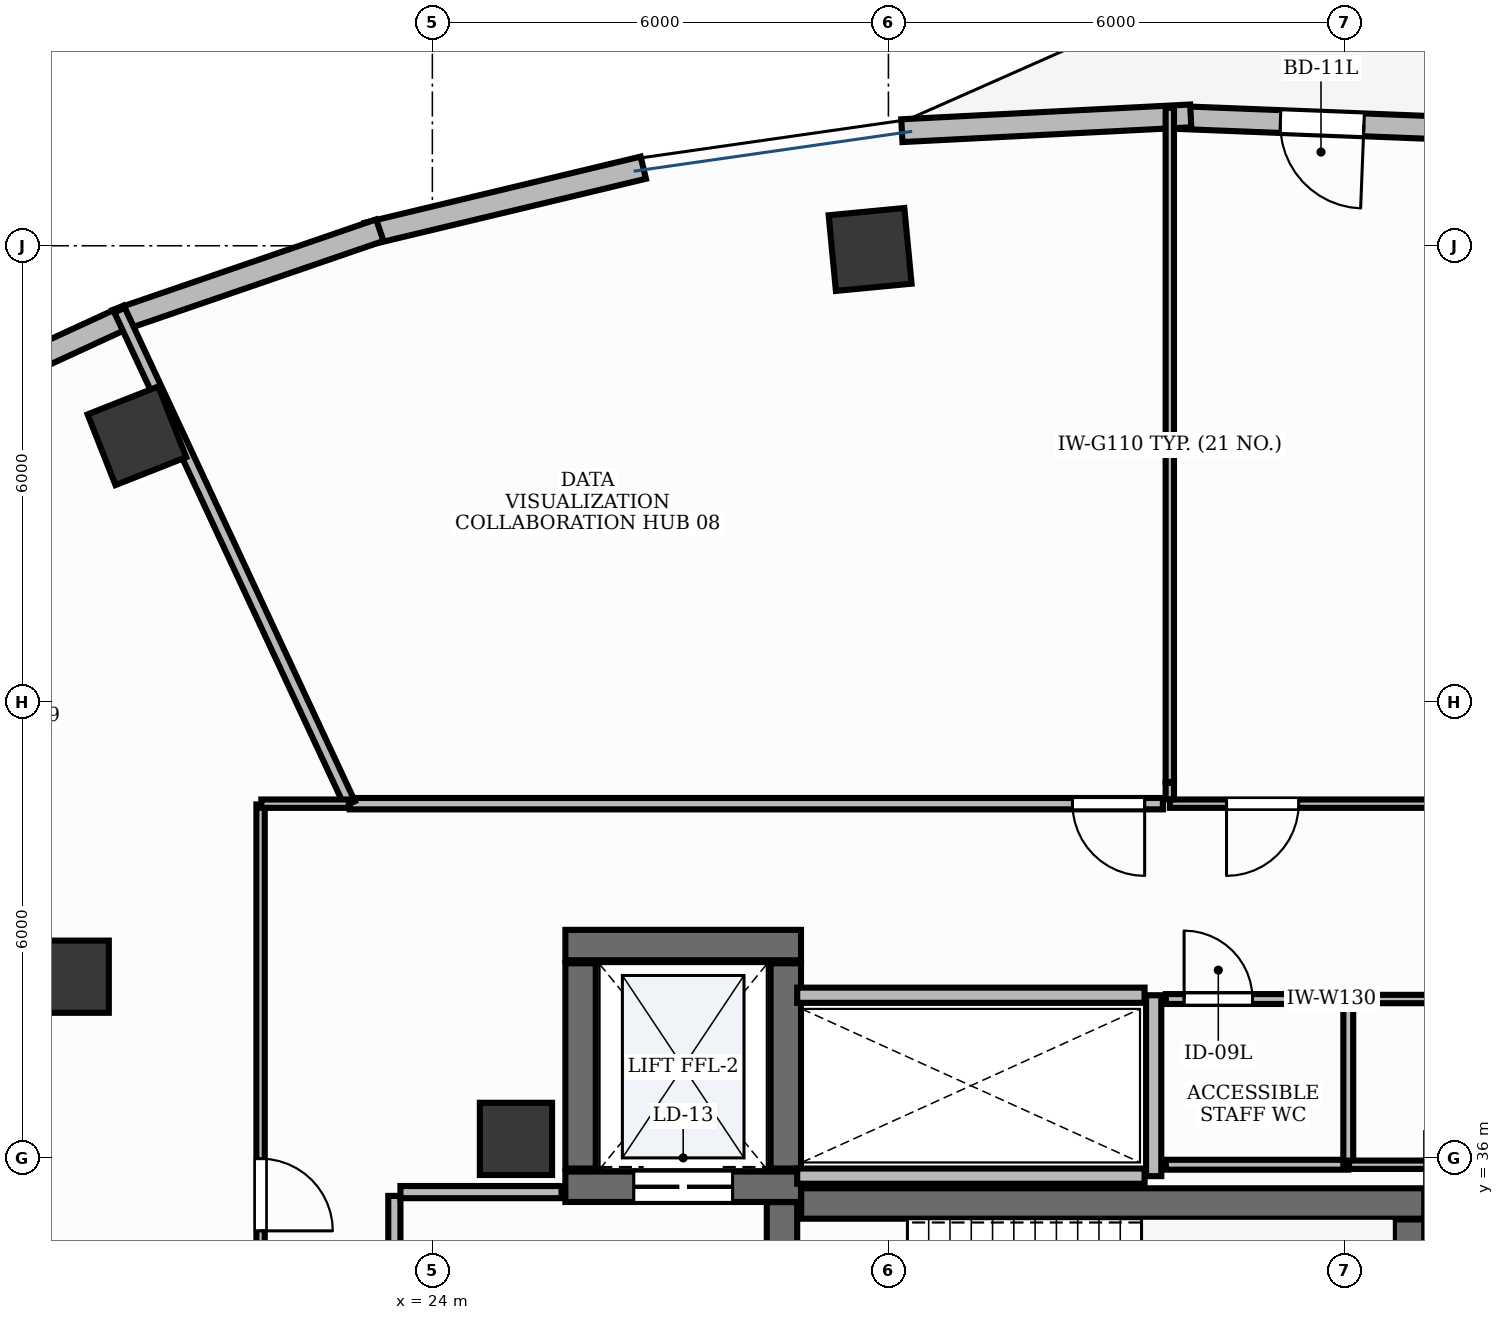
"""IFC4 building model, lengths in metres.
Left out: names, types, materials, properties, quantities, classifications, styles, units other than length and angle.
Written with IfcOpenShell. Run it as: python <this file> out.ifc"""

import sys

from ifc_helpers import new_model, si_unit, direction, frame, frame_2d, origin, origin_2d, place, context, subcontext, project, spatial, rectangle, extrude, element, fill, save


model = new_model("IFC4")
c1 = context("Model", 3, precision=1e-05, world=origin(), true_north=direction((0.0, 1.0)))
c2 = subcontext(c1, "Body", "Model", "MODEL_VIEW")
j1 = project(units=[si_unit("LENGTHUNIT", "METRE"), si_unit("PLANEANGLEUNIT", "RADIAN")], contexts=[c1])
p1 = place(None, origin())
s1 = spatial("IfcSite", under=j1, at=p1, CompositionType="ELEMENT")
p2 = place(p1, origin())
s2 = spatial("IfcBuilding", under=s1, at=p2, CompositionType="ELEMENT")
p3 = place(p2, frame((0.0, 0.0, 231.0)))
s3 = spatial("IfcBuildingStorey", under=s2, at=p3, CompositionType="ELEMENT", Elevation=231.0)
p4 = place(p3, frame((28.852, 35.4, 0.0), z_axis=(0.0, 0.0, 1.0), x_axis=(1.0, 0.0, 0.0)))
e1 = element("IfcWall", 1, at=p4, inside=s3, PredefinedType="SHEAR", context=c2, shape_type="SweptSolid", body=[
    extrude(rectangle(XDim=8.198, YDim=0.4, at=frame_2d((4.099, 0.0))), origin(), (0.0, 0.0, 1.0), 3.9),
])
p5 = place(p3, frame((36.85, 32.11, 0.0), z_axis=(0.0, 0.0, 1.0), x_axis=(0.0, 1.0, 0.0)))
e2 = element("IfcWall", 2, at=p5, inside=s3, PredefinedType="SHEAR", context=c2, shape_type="SweptSolid", body=[
    extrude(rectangle(XDim=3.08, YDim=0.4, at=frame_2d((1.54, 0.0))), origin(), (0.0, 0.0, 1.0), 3.9),
])
p6 = place(p3, frame((28.6, 32.11, 0.0), z_axis=(0.0, 0.0, 1.0), x_axis=(0.0, 1.0, 0.0)))
e3 = element("IfcWall", 3, at=p6, inside=s3, PredefinedType="SHEAR", context=c2, shape_type="SweptSolid", body=[
    extrude(rectangle(XDim=3.308, YDim=0.4, at=frame_2d((1.654, 0.0))), origin(), (0.0, 0.0, 1.0), 3.9),
])
p7 = place(p6, frame((0.2, 0.0, 0.0)))
e4 = element("IfcOpeningElement", 4, at=p7, cuts=e3, PredefinedType="OPENING", context=c2, shape_type="SweptSolid", body=[
    extrude(rectangle(XDim=1.05, YDim=2.15, at=frame_2d((0.525, 1.075))), frame((0.0, 0.215, 0.0), z_axis=(0.0, -1.0, 0.0), x_axis=(1.0, 0.0, 0.0)), (0.0, 0.0, 1.0), 0.43),
])
p8 = place(p3, frame((25.75, 38.8, 0.0), z_axis=(0.0, 0.0, 1.0), x_axis=(1.0, 0.0, 0.0)))
e5 = element("IfcWall", 5, at=p8, inside=s3, PredefinedType="SHEAR", context=c2, shape_type="SweptSolid", body=[
    extrude(rectangle(XDim=3.1, YDim=0.4, at=frame_2d((1.55, 0.0))), origin(), (0.0, 0.0, 1.0), 3.9),
])
p9 = place(p3, frame((25.75, 35.62, 0.0), z_axis=(0.0, 0.0, 1.0), x_axis=(1.0, 0.0, 0.0)))
e6 = element("IfcWall", 6, at=p9, inside=s3, PredefinedType="SHEAR", context=c2, shape_type="SweptSolid", body=[
    extrude(rectangle(XDim=3.1, YDim=0.4, at=frame_2d((1.55, 0.0))), origin(), (0.0, 0.0, 1.0), 3.9),
])
p10 = place(p9, frame((0.9, 0.0, 0.0)))
e7 = element("IfcOpeningElement", 7, at=p10, cuts=e6, PredefinedType="OPENING", context=c2, shape_type="SweptSolid", body=[
    extrude(rectangle(XDim=1.3, YDim=2.2, at=frame_2d((0.65, 1.1))), frame((0.0, 0.215, 0.0), z_axis=(0.0, -1.0, 0.0), x_axis=(1.0, 0.0, 0.0)), (0.0, 0.0, 1.0), 0.43),
])
for number, where, z_axis, x_axis in (
    (8, (25.95, 35.86, 0.0), (0.0, 0.0, 1.0), (0.0, 1.0, 0.0)),
    (9, (28.65, 35.86, 0.0), (0.0, 0.0, 1.0), (0.0, 1.0, 0.0)),
):
    element("IfcWall", number, at=place(p3, frame(where, z_axis=z_axis, x_axis=x_axis)), inside=s3, PredefinedType="SHEAR", context=c2, shape_type="SweptSolid", body=[
        extrude(rectangle(XDim=2.7, YDim=0.4, at=frame_2d((1.35, 0.0))), origin(), (0.0, 0.0, 1.0), 3.9),
    ])
p11 = place(p3, frame((25.1, 36.25, -0.0), z_axis=(0.0, 0.0, 1.0), x_axis=(1.0, 0.0, 0.0)))
e10 = element("IfcColumn", 10, at=p11, inside=s3, PredefinedType="PILASTER", context=c2, shape_type="SweptSolid", body=[
    extrude(rectangle(XDim=0.95, YDim=0.95, at=origin_2d()), origin(), (0.0, 0.0, 1.0), 3.901),
])
for number, where, z_axis, x_axis in (
    (11, (29.759, 47.951, -0.0), (0.0, 0.0, 1.0), (0.995, 0.095, 0.0)),
    (12, (20.113, 45.5, -0.0), (0.0, 0.0, 1.0), (0.93, 0.367, 0.0)),
):
    element("IfcColumn", number, at=place(p3, frame(where, z_axis=z_axis, x_axis=x_axis)), inside=s3, PredefinedType="COLUMN", context=c2, shape_type="SweptSolid", body=[
        extrude(rectangle(XDim=1.0, YDim=1.0, at=origin_2d()), origin(), (0.0, 0.0, 1.0), 3.901),
    ])
p12 = place(p3, frame((19.268, 38.384, -0.0), z_axis=(0.0, 0.0, 1.0), x_axis=(1.0, 0.0, 0.0)))
e13 = element("IfcColumn", 13, at=p12, inside=s3, PredefinedType="COLUMN", context=c2, shape_type="SweptSolid", body=[
    extrude(rectangle(XDim=0.95, YDim=0.95, at=origin_2d()), origin(), (0.0, 0.0, 1.0), 3.901),
])
p13 = place(p3, frame((37.588, 49.538, 0.0), z_axis=(0.0, 0.0, 1.0), x_axis=(-0.999223368644, 0.03940380128, 0.0)))
e14 = element("IfcWall", 14, at=p13, inside=s3, PredefinedType="STANDARD", context=c2, shape_type="SweptSolid", body=[
    extrude(rectangle(XDim=3.767, YDim=0.3, at=frame_2d((1.884, 0.0))), origin(), (0.0, 0.0, 1.0), 3.9),
])
p14 = place(p13, frame((1.333, 0.0, 0.0)))
e15 = element("IfcOpeningElement", 15, at=p14, cuts=e14, PredefinedType="OPENING", context=c2, shape_type="SweptSolid", body=[
    extrude(rectangle(XDim=1.1, YDim=2.15, at=frame_2d((0.55, 1.075))), frame((0.0, 0.165, 0.0), z_axis=(0.0, -1.0, 0.0), x_axis=(1.0, 0.0, 0.0)), (0.0, 0.0, 1.0), 0.33),
])
p15 = place(p3, frame((33.977, 49.708, 0.0), z_axis=(0.0, 0.0, 1.0), x_axis=(-0.998691783215, -0.051134353798, 0.0)))
e16 = element("IfcWall", 16, at=p15, inside=s3, PredefinedType="STANDARD", context=c2, shape_type="SweptSolid", body=[
    extrude(rectangle(XDim=3.805, YDim=0.3, at=frame_2d((1.903, 0.0))), origin(), (0.0, 0.0, 1.0), 3.47),
])
p16 = place(p3, frame((26.775, 49.027, 0.0), z_axis=(0.0, 0.0, 1.0), x_axis=(-0.972475629939, -0.233004611918, 0.0)))
e17 = element("IfcWall", 17, at=p16, inside=s3, PredefinedType="STANDARD", context=c2, shape_type="SweptSolid", body=[
    extrude(rectangle(XDim=3.735, YDim=0.3, at=frame_2d((1.868, 0.0))), origin(), (0.0, 0.0, 1.0), 3.9),
])
p17 = place(p3, frame((23.309, 48.205, 0.0), z_axis=(0.0, 0.0, 1.0), x_axis=(-0.945722383555, -0.32497565023, 0.0)))
e18 = element("IfcWall", 18, at=p17, inside=s3, PredefinedType="STANDARD", context=c2, shape_type="SweptSolid", body=[
    extrude(rectangle(XDim=3.67, YDim=0.3, at=frame_2d((1.835, 0.0))), origin(), (0.0, 0.0, 1.0), 3.9),
])
p18 = place(p3, frame((20.0, 47.077, 0.0), z_axis=(0.0, 0.0, 1.0), x_axis=(-0.908506474671, -0.417870776055, 0.0)))
e19 = element("IfcWall", 19, at=p18, inside=s3, PredefinedType="STANDARD", context=c2, shape_type="SweptSolid", body=[
    extrude(rectangle(XDim=3.587, YDim=0.3, at=frame_2d((1.793, 0.0))), origin(), (0.0, 0.0, 1.0), 3.9),
])
p19 = place(p3, frame((33.49, 35.76, 0.0), z_axis=(0.0, 0.0, 1.0), x_axis=(0.0, 1.0, 0.0)))
e20 = element("IfcWall", 20, at=p19, inside=s3, PredefinedType="PARTITIONING", context=c2, shape_type="SweptSolid", body=[
    extrude(rectangle(XDim=2.38, YDim=0.2, at=frame_2d((1.19, 0.0))), origin(), (0.0, 0.0, 1.0), 2.91),
])
for number, where, z_axis, x_axis in (
    (21, (28.8, 35.76, 0.0), (0.0, 0.0, 1.0), (1.0, 0.0, 0.0)),
    (22, (28.8, 38.14, 0.0), (0.0, 0.0, 1.0), (1.0, 0.0, 0.0)),
):
    element("IfcWall", number, at=place(p3, frame(where, z_axis=z_axis, x_axis=x_axis)), inside=s3, PredefinedType="PARTITIONING", context=c2, shape_type="SweptSolid", body=[
        extrude(rectangle(XDim=4.57, YDim=0.2, at=frame_2d((2.285, 0.0))), origin(), (0.0, 0.0, 1.0), 2.91),
    ])
p20 = place(p3, frame((23.5, 32.1, 0.0), z_axis=(0.0, 0.0, 1.0), x_axis=(0.0, 1.0, 0.0)))
e23 = element("IfcWall", 23, at=p20, inside=s3, PredefinedType="PARTITIONING", context=c2, shape_type="SweptSolid", body=[
    extrude(rectangle(XDim=3.4, YDim=0.16, at=frame_2d((1.7, 0.0))), origin(), (0.0, 0.0, 1.0), 2.91),
])
p21 = place(p20, frame((1.175, 0.0, 0.0)))
e24 = element("IfcOpeningElement", 24, at=p21, cuts=e23, PredefinedType="OPENING", context=c2, shape_type="SweptSolid", body=[
    extrude(rectangle(XDim=1.05, YDim=2.15, at=frame_2d((0.525, 1.075))), frame((0.0, 0.095, 0.0), z_axis=(0.0, -1.0, 0.0), x_axis=(1.0, 0.0, 0.0)), (0.0, 0.0, 1.0), 0.19),
])
p22 = place(p3, frame((23.58, 35.55, 0.0), z_axis=(0.0, 0.0, 1.0), x_axis=(1.0, 0.0, 0.0)))
e25 = element("IfcWall", 25, at=p22, inside=s3, PredefinedType="PARTITIONING", context=c2, shape_type="SweptSolid", body=[
    extrude(rectangle(XDim=2.12, YDim=0.16, at=frame_2d((1.06, 0.0))), origin(), (0.0, 0.0, 1.0), 2.91),
])
p23 = place(p3, frame((33.65, 38.09, 0.0), z_axis=(0.0, 0.0, 1.0), x_axis=(1.0, 0.0, 0.0)))
e26 = element("IfcWall", 26, at=p23, inside=s3, PredefinedType="PARTITIONING", context=c2, shape_type="SweptSolid", body=[
    extrude(rectangle(XDim=2.4, YDim=0.13, at=frame_2d((1.2, 0.0))), origin(), (0.0, 0.0, 1.0), 2.91),
])
p24 = place(p23, frame((0.24, 0.0, 0.0)))
e27 = element("IfcOpeningElement", 27, at=p24, cuts=e26, PredefinedType="OPENING", context=c2, shape_type="SweptSolid", body=[
    extrude(rectangle(XDim=0.9, YDim=2.15, at=frame_2d((0.45, 1.075))), frame((0.0, 0.08, 0.0), z_axis=(0.0, -1.0, 0.0), x_axis=(1.0, 0.0, 0.0)), (0.0, 0.0, 1.0), 0.16),
])
p25 = place(p3, frame((37.2, 40.66, 0.0), z_axis=(0.0, 0.0, 1.0), x_axis=(-1.0, 0.0, 0.0)))
e28 = element("IfcWall", 28, at=p25, inside=s3, PredefinedType="MOVABLE", context=c2, shape_type="SweptSolid", body=[
    extrude(rectangle(XDim=3.498, YDim=0.11, at=frame_2d((1.749, 0.0))), origin(), (0.0, 0.0, 1.0), 2.91),
])
p26 = place(p25, frame((1.802, 0.0, 0.0)))
e29 = element("IfcOpeningElement", 29, at=p26, cuts=e28, PredefinedType="OPENING", context=c2, shape_type="SweptSolid", body=[
    extrude(rectangle(XDim=0.95, YDim=2.15, at=frame_2d((0.475, 1.075))), frame((0.0, 0.07, 0.0), z_axis=(0.0, -1.0, 0.0), x_axis=(1.0, 0.0, 0.0)), (0.0, 0.0, 1.0), 0.14),
])
p27 = place(p3, frame((33.611, 40.66, 0.0), z_axis=(0.0, 0.0, 1.0), x_axis=(-1.0, 0.0, 0.0)))
e30 = element("IfcWall", 30, at=p27, inside=s3, PredefinedType="PARTITIONING", context=c2, shape_type="SweptSolid", body=[
    extrude(rectangle(XDim=10.698, YDim=0.15, at=frame_2d((5.349, 0.0))), origin(), (0.0, 0.0, 1.0), 2.91),
])
p28 = place(p27, frame((0.24, 0.0, 0.0)))
e31 = element("IfcOpeningElement", 31, at=p28, cuts=e30, PredefinedType="OPENING", context=c2, shape_type="SweptSolid", body=[
    extrude(rectangle(XDim=0.95, YDim=2.15, at=frame_2d((0.475, 1.075))), frame((0.0, 0.09, 0.0), z_axis=(0.0, -1.0, 0.0), x_axis=(1.0, 0.0, 0.0)), (0.0, 0.0, 1.0), 0.18),
])
p29 = place(p3, frame((21.74, 40.65, 0.0), z_axis=(0.0, 0.0, 1.0), x_axis=(0.0, -1.0, 0.0)))
e32 = element("IfcWall", 32, at=p29, inside=s3, PredefinedType="MOVABLE", context=c2, shape_type="SweptSolid", body=[
    extrude(rectangle(XDim=5.85, YDim=0.11, at=frame_2d((2.925, 0.0))), origin(), (0.0, 0.0, 1.0), 2.91),
])
p30 = place(p29, frame((4.66, 0.0, 0.0)))
e33 = element("IfcOpeningElement", 33, at=p30, cuts=e32, PredefinedType="OPENING", context=c2, shape_type="SweptSolid", body=[
    extrude(rectangle(XDim=0.95, YDim=2.15, at=frame_2d((0.475, 1.075))), frame((0.0, 0.07, 0.0), z_axis=(0.0, -1.0, 0.0), x_axis=(1.0, 0.0, 0.0)), (0.0, 0.0, 1.0), 0.14),
])
p31 = place(p3, frame((36.05, 35.91, 0.0), z_axis=(0.0, 0.0, 1.0), x_axis=(-1.0, 0.0, 0.0)))
e34 = element("IfcWall", 34, at=p31, inside=s3, PredefinedType="PARTITIONING", context=c2, shape_type="SweptSolid", body=[
    extrude(rectangle(XDim=2.4, YDim=0.13, at=frame_2d((1.2, 0.0))), origin(), (0.0, 0.0, 1.0), 2.91),
])
p32 = place(p3, frame((36.05, 38.09, 0.0), z_axis=(0.0, 0.0, 1.0), x_axis=(0.0, -1.0, 0.0)))
e35 = element("IfcWall", 35, at=p32, inside=s3, PredefinedType="PARTITIONING", context=c2, shape_type="SweptSolid", body=[
    extrude(rectangle(XDim=2.18, YDim=0.13, at=frame_2d((1.09, 0.0))), origin(), (0.0, 0.0, 1.0), 2.91),
])
p33 = place(p3, frame((33.702, 40.946, 0.0), z_axis=(0.0, 0.0, 1.0), x_axis=(0.0, 1.0, 0.0)))
e36 = element("IfcWall", 36, at=p33, inside=s3, PredefinedType="MOVABLE", context=c2, shape_type="SweptSolid", body=[
    extrude(rectangle(XDim=8.868, YDim=0.11, at=frame_2d((4.434, 0.0))), origin(), (0.0, 0.0, 1.0), 2.91),
])
p34 = place(p3, frame((37.35, 35.91, 0.0), z_axis=(0.0, 0.0, 1.0), x_axis=(-1.0, 0.0, 0.0)))
e37 = element("IfcWall", 37, at=p34, inside=s3, PredefinedType="MOVABLE", context=c2, shape_type="SweptSolid", body=[
    extrude(rectangle(XDim=1.29, YDim=0.11, at=frame_2d((0.645, 0.0))), origin(), (0.0, 0.0, 1.0), 2.91),
])
p35 = place(p3, frame((36.06, 38.09, 0.0), z_axis=(0.0, 0.0, 1.0), x_axis=(1.0, 0.0, 0.0)))
e38 = element("IfcWall", 38, at=p35, inside=s3, PredefinedType="MOVABLE", context=c2, shape_type="SweptSolid", body=[
    extrude(rectangle(XDim=1.14, YDim=0.11, at=frame_2d((0.57, 0.0))), origin(), (0.0, 0.0, 1.0), 2.91),
])
p36 = place(p3, frame((33.702, 40.718, 0.0), z_axis=(0.0, 0.0, 1.0), x_axis=(0.0, 1.0, 0.0)))
e39 = element("IfcWall", 39, at=p36, inside=s3, PredefinedType="MOVABLE", context=c2, shape_type="SweptSolid", body=[
    extrude(rectangle(XDim=0.215, YDim=0.11, at=frame_2d((0.107, 0.0))), origin(), (0.0, 0.0, 1.0), 2.91),
])
p37 = place(p3, frame((22.913, 40.66, 0.0), z_axis=(0.0, 0.0, 1.0), x_axis=(-0.422622429436, 0.906305843597, 0.0)))
e40 = element("IfcWall", 40, at=p37, inside=s3, PredefinedType="PARTITIONING", context=c2, shape_type="SweptSolid", body=[
    extrude(rectangle(XDim=7.165, YDim=0.15, at=frame_2d((3.583, 0.0))), origin(), (0.0, 0.0, 1.0), 2.91),
])
p38 = place(p3, frame((22.902, 40.66, 0.0), z_axis=(0.0, 0.0, 1.0), x_axis=(-1.0, 0.0, 0.0)))
e41 = element("IfcWall", 41, at=p38, inside=s3, PredefinedType="MOVABLE", context=c2, shape_type="SweptSolid", body=[
    extrude(rectangle(XDim=1.152, YDim=0.11, at=frame_2d((0.576, 0.0))), origin(), (0.0, 0.0, 1.0), 2.91),
])
p39 = place(p14, origin())
e42 = element("IfcDoor", 42, at=p39, inside=s3, OperationType="SINGLE_SWING_LEFT", PredefinedType="DOOR", context=c2, shape_type="SweptSolid", body=[
    extrude(rectangle(XDim=1.1, YDim=2.15, at=frame_2d((0.55, 1.075))), frame((0.0, 0.025, 0.0), z_axis=(0.0, -1.0, 0.0), x_axis=(1.0, 0.0, 0.0)), (0.0, 0.0, 1.0), 0.05),
])
fill(e15, e42)
p40 = place(p10, origin())
e43 = element("IfcDoor", 43, at=p40, inside=s3, OperationType="DOUBLE_DOOR_SLIDING", PredefinedType="DOOR", context=c2, shape_type="SweptSolid", body=[
    extrude(rectangle(XDim=1.3, YDim=2.2, at=frame_2d((0.65, 1.1))), frame((0.0, 0.025, 0.0), z_axis=(0.0, -1.0, 0.0), x_axis=(1.0, 0.0, 0.0)), (0.0, 0.0, 1.0), 0.05),
])
fill(e7, e43)
p41 = place(p24, origin())
e44 = element("IfcDoor", 44, at=p41, inside=s3, OperationType="SINGLE_SWING_LEFT", PredefinedType="DOOR", context=c2, shape_type="SweptSolid", body=[
    extrude(rectangle(XDim=0.9, YDim=2.15, at=frame_2d((0.45, 1.075))), frame((0.0, 0.025, 0.0), z_axis=(0.0, -1.0, 0.0), x_axis=(1.0, 0.0, 0.0)), (0.0, 0.0, 1.0), 0.05),
])
fill(e27, e44)
p42 = place(p26, origin())
e45 = element("IfcDoor", 45, at=p42, inside=s3, OperationType="SINGLE_SWING_RIGHT", PredefinedType="DOOR", context=c2, shape_type="SweptSolid", body=[
    extrude(rectangle(XDim=0.95, YDim=2.15, at=frame_2d((0.475, 1.075))), frame((0.0, 0.025, 0.0), z_axis=(0.0, -1.0, 0.0), x_axis=(1.0, 0.0, 0.0)), (0.0, 0.0, 1.0), 0.05),
])
fill(e29, e45)
p43 = place(p28, origin())
e46 = element("IfcDoor", 46, at=p43, inside=s3, OperationType="SINGLE_SWING_LEFT", PredefinedType="DOOR", context=c2, shape_type="SweptSolid", body=[
    extrude(rectangle(XDim=0.95, YDim=2.15, at=frame_2d((0.475, 1.075))), frame((0.0, 0.025, 0.0), z_axis=(0.0, -1.0, 0.0), x_axis=(1.0, 0.0, 0.0)), (0.0, 0.0, 1.0), 0.05),
])
fill(e31, e46)
p44 = place(p30, origin())
e47 = element("IfcDoor", 47, at=p44, inside=s3, OperationType="SINGLE_SWING_RIGHT", PredefinedType="DOOR", context=c2, shape_type="SweptSolid", body=[
    extrude(rectangle(XDim=0.95, YDim=2.15, at=frame_2d((0.475, 1.075))), frame((0.0, 0.025, 0.0), z_axis=(0.0, -1.0, 0.0), x_axis=(1.0, 0.0, 0.0)), (0.0, 0.0, 1.0), 0.05),
])
fill(e33, e47)
save(model, sys.argv[1])
